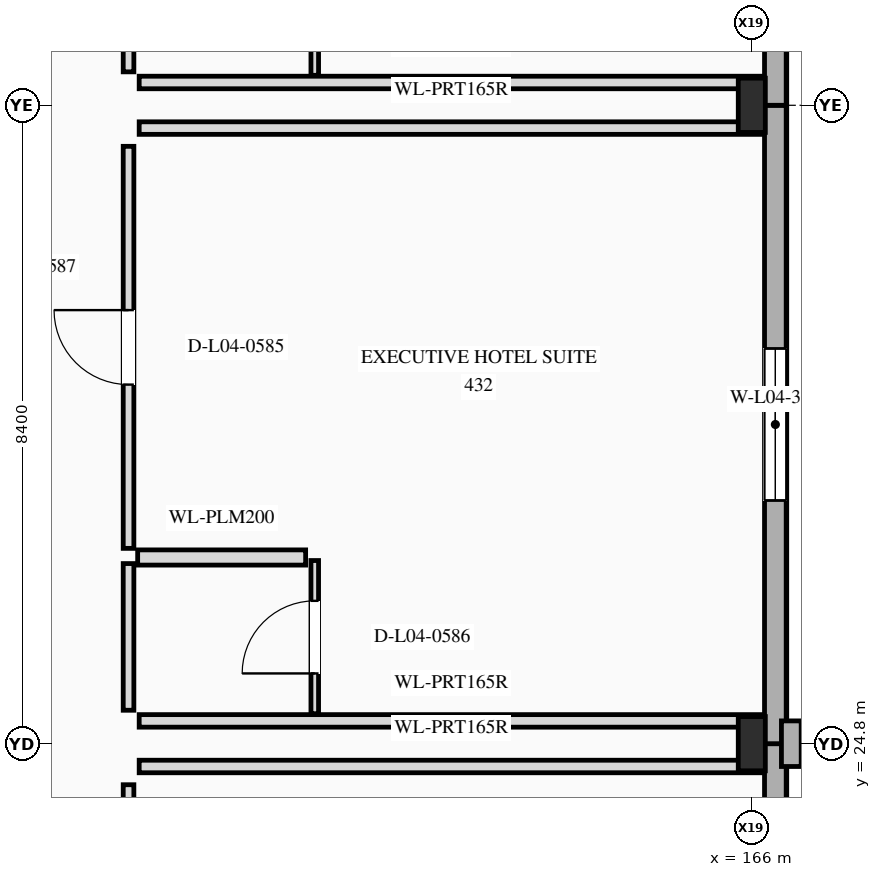
"""IFC4 building model, lengths in metres.
Left out: names, types, materials, properties, quantities, classifications, styles, units other than length and angle.
Written with IfcOpenShell. Run it as: python <this file> out.ifc"""

import sys

from ifc_helpers import new_model, si_unit, direction, frame, frame_2d, origin, origin_2d, place, context, subcontext, project, spatial, rectangle, i_section, extrude, element, fill, save


model = new_model("IFC4")
c1 = context("Model", 3, precision=1e-05, world=origin(), true_north=direction((0.0, 1.0)))
c2 = subcontext(c1, "Body", "Model", "MODEL_VIEW")
j1 = project(units=[si_unit("LENGTHUNIT", "METRE"), si_unit("PLANEANGLEUNIT", "RADIAN")], contexts=[c1])
p1 = place(None, origin())
s1 = spatial("IfcSite", under=j1, at=p1, CompositionType="ELEMENT")
p2 = place(p1, origin())
s2 = spatial("IfcBuilding", under=s1, at=p2, CompositionType="ELEMENT")
p3 = place(p2, frame((0.0, 0.0, 19.5)))
s3 = spatial("IfcBuildingStorey", under=s2, at=p3, CompositionType="ELEMENT", Elevation=19.5)
for number, where, z_axis, x_axis in (
    (1, (166.0, 24.8, 0.0), (0.0, 0.0, 1.0), (1.0, 0.0, 0.0)),
    (2, (166.0, 33.2, 0.0), (0.0, 0.0, 1.0), (1.0, 0.0, 0.0)),
):
    element("IfcColumn", number, at=place(p3, frame(where, z_axis=z_axis, x_axis=x_axis)), inside=s3, PredefinedType="COLUMN", context=c2, shape_type="SweptSolid", body=[
        extrude(i_section(OverallWidth=0.356, OverallDepth=0.714, WebThickness=0.019, FlangeThickness=0.034, at=origin_2d()), origin(), (0.0, 0.0, 1.0), 3.9),
    ])
p4 = place(p3, frame((166.31, 18.8, 0.0), z_axis=(0.0, 0.0, 1.0), x_axis=(0.0, 1.0, 0.0)))
e3 = element("IfcWall", 3, at=p4, inside=s3, PredefinedType="STANDARD", context=c2, shape_type="SweptSolid", body=[
    extrude(rectangle(XDim=6.0, YDim=0.285, at=frame_2d((3.0, 0.0))), origin(), (0.0, 0.0, 1.0), 3.9),
])
p5 = place(p4, frame((2.0, 0.0, 0.85)))
e4 = element("IfcOpeningElement", 4, at=p5, cuts=e3, PredefinedType="OPENING", context=c2, shape_type="SweptSolid", body=[
    extrude(rectangle(XDim=2.0, YDim=1.65, at=frame_2d((1.0, 0.825))), frame((0.0, 0.152, 0.0), z_axis=(0.0, -1.0, 0.0), x_axis=(1.0, 0.0, 0.0)), (0.0, 0.0, 1.0), 0.305),
])
p6 = place(p3, frame((166.31, 24.8, 0.0), z_axis=(0.0, 0.0, 1.0), x_axis=(0.0, 1.0, 0.0)))
e5 = element("IfcWall", 5, at=p6, inside=s3, PredefinedType="STANDARD", context=c2, shape_type="SweptSolid", body=[
    extrude(rectangle(XDim=8.4, YDim=0.285, at=frame_2d((4.2, 0.0))), origin(), (0.0, 0.0, 1.0), 3.9),
])
p7 = place(p6, frame((3.2, 0.0, 0.85)))
e6 = element("IfcOpeningElement", 6, at=p7, cuts=e5, PredefinedType="OPENING", context=c2, shape_type="SweptSolid", body=[
    extrude(rectangle(XDim=2.0, YDim=1.65, at=frame_2d((1.0, 0.825))), frame((0.0, 0.152, 0.0), z_axis=(0.0, -1.0, 0.0), x_axis=(1.0, 0.0, 0.0)), (0.0, 0.0, 1.0), 0.305),
])
p8 = place(p3, frame((166.52, 24.5, 0.0), z_axis=(0.0, 0.0, 1.0), x_axis=(0.0, 1.0, 0.0)))
e7 = element("IfcWall", 7, at=p8, inside=s3, PredefinedType="ELEMENTEDWALL", context=c2, shape_type="SweptSolid", body=[
    extrude(rectangle(XDim=0.6, YDim=0.26, at=frame_2d((0.3, 0.0))), origin(), (0.0, 0.0, 1.0), 3.9),
])
p9 = place(p3, frame((166.31, 33.2, 0.0), z_axis=(0.0, 0.0, 1.0), x_axis=(0.0, 1.0, 0.0)))
e8 = element("IfcWall", 8, at=p9, inside=s3, PredefinedType="STANDARD", context=c2, shape_type="SweptSolid", body=[
    extrude(rectangle(XDim=1.34, YDim=0.285, at=frame_2d((0.67, 0.0))), origin(), (0.0, 0.0, 1.0), 3.9),
])
p10 = place(p3, frame((157.8, 21.37, 0.0), z_axis=(0.0, 0.0, 1.0), x_axis=(0.0, 1.0, 0.0)))
e9 = element("IfcWall", 9, at=p10, inside=s3, PredefinedType="PARTITIONING", context=c2, shape_type="SweptSolid", body=[
    extrude(rectangle(XDim=2.89, YDim=0.14, at=frame_2d((1.445, 0.0))), origin(), (0.0, 0.0, 1.0), 3.143),
])
p11 = place(p10, frame((0.985, 0.0, 0.0)))
e10 = element("IfcOpeningElement", 10, at=p11, cuts=e9, PredefinedType="OPENING", context=c2, shape_type="SweptSolid", body=[
    extrude(rectangle(XDim=0.92, YDim=2.15, at=frame_2d((0.46, 1.075))), frame((0.0, 0.08, 0.0), z_axis=(0.0, -1.0, 0.0), x_axis=(1.0, 0.0, 0.0)), (0.0, 0.0, 1.0), 0.16),
])
p12 = place(p3, frame((157.94, 24.5, 0.0), z_axis=(0.0, 0.0, 1.0), x_axis=(1.0, 0.0, 0.0)))
e11 = element("IfcWall", 11, at=p12, inside=s3, PredefinedType="PARTITIONING", context=c2, shape_type="SweptSolid", body=[
    extrude(rectangle(XDim=8.213, YDim=0.165, at=frame_2d((4.106, 0.0))), origin(), (0.0, 0.0, 1.0), 2.975),
])
p13 = place(p3, frame((157.8, 25.24, 0.0), z_axis=(0.0, 0.0, 1.0), x_axis=(0.0, 1.0, 0.0)))
e12 = element("IfcWall", 12, at=p13, inside=s3, PredefinedType="PARTITIONING", context=c2, shape_type="SweptSolid", body=[
    extrude(rectangle(XDim=1.93, YDim=0.14, at=frame_2d((0.965, 0.0))), origin(), (0.0, 0.0, 1.0), 3.138),
])
p14 = place(p3, frame((157.8, 27.37, 0.0), z_axis=(0.0, 0.0, 1.0), x_axis=(0.0, 1.0, 0.0)))
e13 = element("IfcWall", 13, at=p14, inside=s3, PredefinedType="PARTITIONING", context=c2, shape_type="SweptSolid", body=[
    extrude(rectangle(XDim=5.29, YDim=0.14, at=frame_2d((2.645, 0.0))), origin(), (0.0, 0.0, 1.0), 3.138),
])
p15 = place(p14, frame((2.155, 0.0, 0.0)))
e14 = element("IfcOpeningElement", 14, at=p15, cuts=e13, PredefinedType="OPENING", context=c2, shape_type="SweptSolid", body=[
    extrude(rectangle(XDim=0.98, YDim=2.2, at=frame_2d((0.49, 1.1))), frame((0.0, 0.08, 0.0), z_axis=(0.0, -1.0, 0.0), x_axis=(1.0, 0.0, 0.0)), (0.0, 0.0, 1.0), 0.16),
])
for number, where, z_axis, x_axis in (
    (15, (157.94, 25.1, 0.0), (0.0, 0.0, 1.0), (1.0, 0.0, 0.0)),
    (16, (157.94, 32.9, 0.0), (0.0, 0.0, 1.0), (1.0, 0.0, 0.0)),
):
    element("IfcWall", number, at=place(p3, frame(where, z_axis=z_axis, x_axis=x_axis)), inside=s3, PredefinedType="PARTITIONING", context=c2, shape_type="SweptSolid", body=[
        extrude(rectangle(XDim=8.213, YDim=0.165, at=frame_2d((4.106, 0.0))), origin(), (0.0, 0.0, 1.0), 2.975),
    ])
p16 = place(p3, frame((157.92, 27.25, 0.0), z_axis=(0.0, 0.0, 1.0), x_axis=(1.0, 0.0, 0.0)))
e17 = element("IfcWall", 17, at=p16, inside=s3, PredefinedType="PLUMBINGWALL", context=c2, shape_type="SweptSolid", body=[
    extrude(rectangle(XDim=2.21, YDim=0.2, at=frame_2d((1.105, 0.0))), origin(), (0.0, 0.0, 1.0), 3.585),
])
p17 = place(p3, frame((160.25, 25.195, 0.0), z_axis=(0.0, 0.0, 1.0), x_axis=(0.0, 1.0, 0.0)))
e18 = element("IfcWall", 18, at=p17, inside=s3, PredefinedType="PARTITIONING", context=c2, shape_type="SweptSolid", body=[
    extrude(rectangle(XDim=2.015, YDim=0.1, at=frame_2d((1.008, 0.0))), origin(), (0.0, 0.0, 1.0), 3.138),
])
p18 = place(p17, frame((0.53, 0.0, 0.0)))
e19 = element("IfcOpeningElement", 19, at=p18, cuts=e18, PredefinedType="OPENING", context=c2, shape_type="SweptSolid", body=[
    extrude(rectangle(XDim=0.955, YDim=2.14, at=frame_2d((0.478, 1.07))), frame((0.0, 0.06, 0.0), z_axis=(0.0, -1.0, 0.0), x_axis=(1.0, 0.0, 0.0)), (0.0, 0.0, 1.0), 0.12),
])
p19 = place(p3, frame((157.8, 33.64, 0.0), z_axis=(0.0, 0.0, 1.0), x_axis=(0.0, 1.0, 0.0)))
e20 = element("IfcWall", 20, at=p19, inside=s3, PredefinedType="PARTITIONING", context=c2, shape_type="SweptSolid", body=[
    extrude(rectangle(XDim=1.93, YDim=0.14, at=frame_2d((0.965, 0.0))), origin(), (0.0, 0.0, 1.0), 3.585),
])
p20 = place(p3, frame((157.94, 33.5, 0.0), z_axis=(0.0, 0.0, 1.0), x_axis=(1.0, 0.0, 0.0)))
e21 = element("IfcWall", 21, at=p20, inside=s3, PredefinedType="PARTITIONING", context=c2, shape_type="SweptSolid", body=[
    extrude(rectangle(XDim=8.213, YDim=0.165, at=frame_2d((4.106, 0.0))), origin(), (0.0, 0.0, 1.0), 2.975),
])
p21 = place(p3, frame((160.25, 33.594, 0.0), z_axis=(0.0, 0.0, 1.0), x_axis=(0.0, 1.0, 0.0)))
e22 = element("IfcWall", 22, at=p21, inside=s3, PredefinedType="PARTITIONING", context=c2, shape_type="SweptSolid", body=[
    extrude(rectangle(XDim=2.016, YDim=0.1, at=frame_2d((1.008, 0.0))), origin(), (0.0, 0.0, 1.0), 3.585),
])
p22 = place(p21, frame((0.555, 0.0, 0.0)))
e23 = element("IfcOpeningElement", 23, at=p22, cuts=e22, PredefinedType="OPENING", context=c2, shape_type="SweptSolid", body=[
    extrude(rectangle(XDim=0.905, YDim=2.18, at=frame_2d((0.453, 1.09))), frame((0.0, 0.06, 0.0), z_axis=(0.0, -1.0, 0.0), x_axis=(1.0, 0.0, 0.0)), (0.0, 0.0, 1.0), 0.12),
])
p23 = place(p7, origin())
e24 = element("IfcWindow", 24, at=p23, inside=s3, PartitioningType="SINGLE_PANEL", PredefinedType="WINDOW", context=c2, shape_type="SweptSolid", body=[
    extrude(rectangle(XDim=2.0, YDim=1.65, at=frame_2d((1.0, 0.825))), frame((0.0, 0.03, 0.0), z_axis=(0.0, -1.0, 0.0), x_axis=(1.0, 0.0, 0.0)), (0.0, 0.0, 1.0), 0.06),
])
fill(e6, e24)
p24 = place(p15, origin())
e25 = element("IfcDoor", 25, at=p24, inside=s3, OperationType="SINGLE_SWING_RIGHT", PredefinedType="DOOR", context=c2, shape_type="SweptSolid", body=[
    extrude(rectangle(XDim=0.98, YDim=2.2, at=frame_2d((0.49, 1.1))), frame((0.0, 0.025, 0.0), z_axis=(0.0, -1.0, 0.0), x_axis=(1.0, 0.0, 0.0)), (0.0, 0.0, 1.0), 0.05),
])
fill(e14, e25)
p25 = place(p18, origin())
e26 = element("IfcDoor", 26, at=p25, inside=s3, OperationType="SINGLE_SWING_LEFT", PredefinedType="DOOR", context=c2, shape_type="SweptSolid", body=[
    extrude(rectangle(XDim=0.955, YDim=2.14, at=frame_2d((0.478, 1.07))), frame((0.0, 0.025, 0.0), z_axis=(0.0, -1.0, 0.0), x_axis=(1.0, 0.0, 0.0)), (0.0, 0.0, 1.0), 0.05),
])
fill(e19, e26)
save(model, sys.argv[1])
